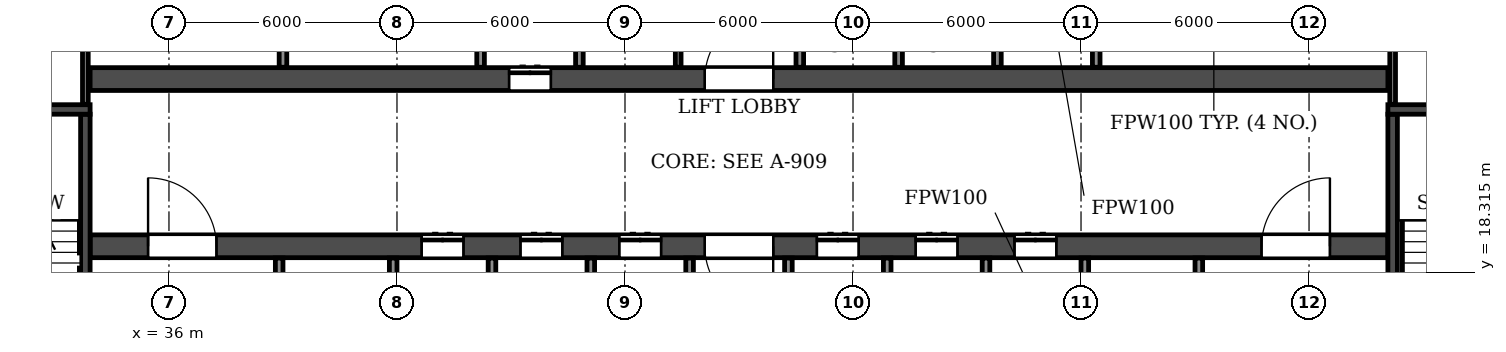
"""IFC4 building model, lengths in metres.
Left out: names, types, materials, properties, quantities, classifications, styles, units other than length and angle.
Written with IfcOpenShell. Run it as: python <this file> out.ifc"""

import sys

from ifc_helpers import new_model, si_unit, direction, frame, frame_2d, origin, place, context, subcontext, project, spatial, rectangle, extrude, element, fill, save


model = new_model("IFC4")
c1 = context("Model", 3, precision=1e-05, world=origin(), true_north=direction((0.0, 1.0)))
c2 = subcontext(c1, "Body", "Model", "MODEL_VIEW")
j1 = project(units=[si_unit("LENGTHUNIT", "METRE"), si_unit("PLANEANGLEUNIT", "RADIAN")], contexts=[c1])
p1 = place(None, origin())
s1 = spatial("IfcSite", under=j1, at=p1, CompositionType="ELEMENT")
p2 = place(p1, origin())
s2 = spatial("IfcBuilding", under=s1, at=p2, CompositionType="ELEMENT")
p3 = place(p2, frame((0.0, 0.0, 43.2)))
s3 = spatial("IfcBuildingStorey", under=s2, at=p3, CompositionType="ELEMENT", Elevation=43.2)
p4 = place(p3, frame((33.925, 19.0, 0.0), z_axis=(0.0, 0.0, 1.0), x_axis=(1.0, 0.0, 0.0)))
e1 = element("IfcWall", 1, at=p4, inside=s3, PredefinedType="SOLIDWALL", context=c2, shape_type="SweptSolid", body=[
    extrude(rectangle(XDim=34.15, YDim=0.6, at=frame_2d((17.075, 0.0))), origin(), (0.0, 0.0, 1.0), 3.05),
])
p5 = place(p4, frame((16.175, 0.0, 0.0)))
e2 = element("IfcOpeningElement", 2, at=p5, cuts=e1, PredefinedType="OPENING", context=c2, shape_type="SweptSolid", body=[
    extrude(rectangle(XDim=1.8, YDim=2.1, at=frame_2d((0.9, 1.05))), frame((0.0, 0.31, 0.0), z_axis=(0.0, -1.0, 0.0), x_axis=(1.0, 0.0, 0.0)), (0.0, 0.0, 1.0), 0.62),
])
p6 = place(p4, frame((1.525, 0.0, 0.0)))
e3 = element("IfcOpeningElement", 3, at=p6, cuts=e1, PredefinedType="OPENING", context=c2, shape_type="SweptSolid", body=[
    extrude(rectangle(XDim=1.8, YDim=2.1, at=frame_2d((0.9, 1.05))), frame((0.0, 0.31, 0.0), z_axis=(0.0, -1.0, 0.0), x_axis=(1.0, 0.0, 0.0)), (0.0, 0.0, 1.0), 0.62),
])
p7 = place(p4, frame((8.725, 0.0, 0.0)))
e4 = element("IfcOpeningElement", 4, at=p7, cuts=e1, PredefinedType="OPENING", context=c2, shape_type="SweptSolid", body=[
    extrude(rectangle(XDim=1.1, YDim=2.1, at=frame_2d((0.55, 1.05))), frame((0.0, 0.31, 0.0), z_axis=(0.0, -1.0, 0.0), x_axis=(1.0, 0.0, 0.0)), (0.0, 0.0, 1.0), 0.62),
])
p8 = place(p4, frame((11.325, 0.0, 0.0)))
e5 = element("IfcOpeningElement", 5, at=p8, cuts=e1, PredefinedType="OPENING", context=c2, shape_type="SweptSolid", body=[
    extrude(rectangle(XDim=1.1, YDim=2.1, at=frame_2d((0.55, 1.05))), frame((0.0, 0.31, 0.0), z_axis=(0.0, -1.0, 0.0), x_axis=(1.0, 0.0, 0.0)), (0.0, 0.0, 1.0), 0.62),
])
p9 = place(p4, frame((13.925, 0.0, 0.0)))
e6 = element("IfcOpeningElement", 6, at=p9, cuts=e1, PredefinedType="OPENING", context=c2, shape_type="SweptSolid", body=[
    extrude(rectangle(XDim=1.1, YDim=2.1, at=frame_2d((0.55, 1.05))), frame((0.0, 0.31, 0.0), z_axis=(0.0, -1.0, 0.0), x_axis=(1.0, 0.0, 0.0)), (0.0, 0.0, 1.0), 0.62),
])
p10 = place(p4, frame((19.125, 0.0, 0.0)))
e7 = element("IfcOpeningElement", 7, at=p10, cuts=e1, PredefinedType="OPENING", context=c2, shape_type="SweptSolid", body=[
    extrude(rectangle(XDim=1.1, YDim=2.1, at=frame_2d((0.55, 1.05))), frame((0.0, 0.31, 0.0), z_axis=(0.0, -1.0, 0.0), x_axis=(1.0, 0.0, 0.0)), (0.0, 0.0, 1.0), 0.62),
])
p11 = place(p4, frame((21.725, 0.0, 0.0)))
e8 = element("IfcOpeningElement", 8, at=p11, cuts=e1, PredefinedType="OPENING", context=c2, shape_type="SweptSolid", body=[
    extrude(rectangle(XDim=1.1, YDim=2.1, at=frame_2d((0.55, 1.05))), frame((0.0, 0.31, 0.0), z_axis=(0.0, -1.0, 0.0), x_axis=(1.0, 0.0, 0.0)), (0.0, 0.0, 1.0), 0.62),
])
p12 = place(p4, frame((24.325, 0.0, 0.0)))
e9 = element("IfcOpeningElement", 9, at=p12, cuts=e1, PredefinedType="OPENING", context=c2, shape_type="SweptSolid", body=[
    extrude(rectangle(XDim=1.1, YDim=2.1, at=frame_2d((0.55, 1.05))), frame((0.0, 0.31, 0.0), z_axis=(0.0, -1.0, 0.0), x_axis=(1.0, 0.0, 0.0)), (0.0, 0.0, 1.0), 0.62),
])
p13 = place(p4, frame((30.825, 0.0, 0.0)))
e10 = element("IfcOpeningElement", 10, at=p13, cuts=e1, PredefinedType="OPENING", context=c2, shape_type="SweptSolid", body=[
    extrude(rectangle(XDim=1.8, YDim=2.1, at=frame_2d((0.9, 1.05))), frame((0.0, 0.31, 0.0), z_axis=(0.0, -1.0, 0.0), x_axis=(1.0, 0.0, 0.0)), (0.0, 0.0, 1.0), 0.62),
])
p14 = place(p3, frame((33.925, 23.4, 0.0), z_axis=(0.0, 0.0, 1.0), x_axis=(1.0, 0.0, 0.0)))
e11 = element("IfcWall", 11, at=p14, inside=s3, PredefinedType="SOLIDWALL", context=c2, shape_type="SweptSolid", body=[
    extrude(rectangle(XDim=34.15, YDim=0.6, at=frame_2d((17.075, 0.0))), origin(), (0.0, 0.0, 1.0), 3.05),
])
p15 = place(p14, frame((16.175, 0.0, 0.0)))
e12 = element("IfcOpeningElement", 12, at=p15, cuts=e11, PredefinedType="OPENING", context=c2, shape_type="SweptSolid", body=[
    extrude(rectangle(XDim=1.8, YDim=2.1, at=frame_2d((0.9, 1.05))), frame((0.0, 0.31, 0.0), z_axis=(0.0, -1.0, 0.0), x_axis=(1.0, 0.0, 0.0)), (0.0, 0.0, 1.0), 0.62),
])
p16 = place(p14, frame((11.025, 0.0, 0.0)))
e13 = element("IfcOpeningElement", 13, at=p16, cuts=e11, PredefinedType="OPENING", context=c2, shape_type="SweptSolid", body=[
    extrude(rectangle(XDim=1.1, YDim=2.1, at=frame_2d((0.55, 1.05))), frame((0.0, 0.31, 0.0), z_axis=(0.0, -1.0, 0.0), x_axis=(1.0, 0.0, 0.0)), (0.0, 0.0, 1.0), 0.62),
])
p17 = place(p3, frame((33.8, 14.9, 0.0), z_axis=(0.0, 0.0, 1.0), x_axis=(0.0, 1.0, 0.0)))
e14 = element("IfcWall", 14, at=p17, inside=s3, PredefinedType="SOLIDWALL", context=c2, shape_type="SweptSolid", body=[
    extrude(rectangle(XDim=7.575, YDim=0.25, at=frame_2d((3.788, 0.0))), origin(), (0.0, 0.0, 1.0), 3.05),
])
p18 = place(p17, frame((0.4, 0.0, 0.0)))
e15 = element("IfcOpeningElement", 15, at=p18, cuts=e14, PredefinedType="OPENING", context=c2, shape_type="SweptSolid", body=[
    extrude(rectangle(XDim=1.0, YDim=2.1, at=frame_2d((0.5, 1.05))), frame((0.0, 0.135, 0.0), z_axis=(0.0, -1.0, 0.0), x_axis=(1.0, 0.0, 0.0)), (0.0, 0.0, 1.0), 0.27),
])
p19 = place(p3, frame((29.875, 22.6, 0.0), z_axis=(0.0, 0.0, 1.0), x_axis=(1.0, 0.0, 0.0)))
e16 = element("IfcWall", 16, at=p19, inside=s3, PredefinedType="SOLIDWALL", context=c2, shape_type="SweptSolid", body=[
    extrude(rectangle(XDim=4.05, YDim=0.25, at=frame_2d((2.025, 0.0))), origin(), (0.0, 0.0, 1.0), 3.05),
])
p20 = place(p3, frame((68.2, 14.9, 0.0), z_axis=(0.0, 0.0, 1.0), x_axis=(0.0, 1.0, 0.0)))
e17 = element("IfcWall", 17, at=p20, inside=s3, PredefinedType="SOLIDWALL", context=c2, shape_type="SweptSolid", body=[
    extrude(rectangle(XDim=7.575, YDim=0.25, at=frame_2d((3.788, 0.0))), origin(), (0.0, 0.0, 1.0), 3.05),
])
p21 = place(p20, frame((0.4, 0.0, 0.0)))
e18 = element("IfcOpeningElement", 18, at=p21, cuts=e17, PredefinedType="OPENING", context=c2, shape_type="SweptSolid", body=[
    extrude(rectangle(XDim=1.0, YDim=2.1, at=frame_2d((0.5, 1.05))), frame((0.0, 0.135, 0.0), z_axis=(0.0, -1.0, 0.0), x_axis=(1.0, 0.0, 0.0)), (0.0, 0.0, 1.0), 0.27),
])
p22 = place(p3, frame((68.075, 22.6, 0.0), z_axis=(0.0, 0.0, 1.0), x_axis=(1.0, 0.0, 0.0)))
e19 = element("IfcWall", 19, at=p22, inside=s3, PredefinedType="SOLIDWALL", context=c2, shape_type="SweptSolid", body=[
    extrude(rectangle(XDim=4.05, YDim=0.25, at=frame_2d((2.025, 0.0))), origin(), (0.0, 0.0, 1.0), 3.05),
])
p23 = place(p3, frame((49.4, 23.71, 0.0), z_axis=(0.0, 0.0, 1.0), x_axis=(0.0, 1.0, 0.0)))
e20 = element("IfcWall", 20, at=p23, inside=s3, PredefinedType="PARTITIONING", context=c2, shape_type="SweptSolid", body=[
    extrude(rectangle(XDim=3.78, YDim=0.15, at=frame_2d((1.89, 0.0))), origin(), (0.0, 0.0, 1.0), 3.05),
])
p24 = place(p3, frame((39.0, 23.71, 0.0), z_axis=(0.0, 0.0, 1.0), x_axis=(0.0, 1.0, 0.0)))
e21 = element("IfcWall", 21, at=p24, inside=s3, PredefinedType="PARTITIONING", context=c2, shape_type="SweptSolid", body=[
    extrude(rectangle(XDim=3.78, YDim=0.2, at=frame_2d((1.89, 0.0))), origin(), (0.0, 0.0, 1.0), 3.05),
])
for number, where, z_axis, x_axis in (
    (22, (33.8, 22.735, 0.0), (0.0, 0.0, 1.0), (0.0, 1.0, 0.0)),
    (23, (68.2, 22.735, 0.0), (0.0, 0.0, 1.0), (0.0, 1.0, 0.0)),
):
    element("IfcWall", number, at=place(p3, frame(where, z_axis=z_axis, x_axis=x_axis)), inside=s3, PredefinedType="PARTITIONING", context=c2, shape_type="SweptSolid", body=[
        extrude(rectangle(XDim=4.755, YDim=0.15, at=frame_2d((2.377, 0.0))), origin(), (0.0, 0.0, 1.0), 3.05),
    ])
p25 = place(p3, frame((38.9, 14.91, 0.0), z_axis=(0.0, 0.0, 1.0), x_axis=(0.0, 1.0, 0.0)))
e24 = element("IfcWall", 24, at=p25, inside=s3, PredefinedType="PARTITIONING", context=c2, shape_type="SweptSolid", body=[
    extrude(rectangle(XDim=3.78, YDim=0.2, at=frame_2d((1.89, 0.0))), origin(), (0.0, 0.0, 1.0), 3.05),
])
p26 = place(p25, frame((1.34, 0.0, 0.0)))
e25 = element("IfcOpeningElement", 25, at=p26, cuts=e24, PredefinedType="OPENING", context=c2, shape_type="SweptSolid", body=[
    extrude(rectangle(XDim=1.1, YDim=2.1, at=frame_2d((0.55, 1.05))), frame((0.0, 0.11, 0.0), z_axis=(0.0, -1.0, 0.0), x_axis=(1.0, 0.0, 0.0)), (0.0, 0.0, 1.0), 0.22),
])
for number, where, z_axis, x_axis in (
    (26, (41.9, 14.91, 0.0), (0.0, 0.0, 1.0), (0.0, 1.0, 0.0)),
    (27, (44.2, 23.71, 0.0), (0.0, 0.0, 1.0), (0.0, 1.0, 0.0)),
):
    element("IfcWall", number, at=place(p3, frame(where, z_axis=z_axis, x_axis=x_axis)), inside=s3, PredefinedType="PARTITIONING", context=c2, shape_type="SweptSolid", body=[
        extrude(rectangle(XDim=3.78, YDim=0.2, at=frame_2d((1.89, 0.0))), origin(), (0.0, 0.0, 1.0), 3.05),
    ])
p27 = place(p3, frame((44.5, 16.3, 0.0), z_axis=(0.0, 0.0, 1.0), x_axis=(0.0, 1.0, 0.0)))
e28 = element("IfcWall", 28, at=p27, inside=s3, PredefinedType="PARTITIONING", context=c2, shape_type="SweptSolid", body=[
    extrude(rectangle(XDim=2.39, YDim=0.2, at=frame_2d((1.195, 0.0))), origin(), (0.0, 0.0, 1.0), 3.05),
])
p28 = place(p3, frame((46.8, 23.71, 0.0), z_axis=(0.0, 0.0, 1.0), x_axis=(0.0, 1.0, 0.0)))
e29 = element("IfcWall", 29, at=p28, inside=s3, PredefinedType="PARTITIONING", context=c2, shape_type="SweptSolid", body=[
    extrude(rectangle(XDim=3.78, YDim=0.2, at=frame_2d((1.89, 0.0))), origin(), (0.0, 0.0, 1.0), 3.05),
])
for number, where, z_axis, x_axis in (
    (30, (47.1, 16.3, 0.0), (0.0, 0.0, 1.0), (0.0, 1.0, 0.0)),
    (31, (49.7, 16.3, 0.0), (0.0, 0.0, 1.0), (0.0, 1.0, 0.0)),
    (32, (52.3, 16.3, 0.0), (0.0, 0.0, 1.0), (0.0, 1.0, 0.0)),
):
    element("IfcWall", number, at=place(p3, frame(where, z_axis=z_axis, x_axis=x_axis)), inside=s3, PredefinedType="PARTITIONING", context=c2, shape_type="SweptSolid", body=[
        extrude(rectangle(XDim=2.39, YDim=0.2, at=frame_2d((1.195, 0.0))), origin(), (0.0, 0.0, 1.0), 3.05),
    ])
p29 = place(p3, frame((52.6, 23.71, 0.0), z_axis=(0.0, 0.0, 1.0), x_axis=(0.0, 1.0, 0.0)))
e33 = element("IfcWall", 33, at=p29, inside=s3, PredefinedType="PARTITIONING", context=c2, shape_type="SweptSolid", body=[
    extrude(rectangle(XDim=2.39, YDim=0.2, at=frame_2d((1.195, 0.0))), origin(), (0.0, 0.0, 1.0), 3.05),
])
p30 = place(p3, frame((54.9, 16.3, 0.0), z_axis=(0.0, 0.0, 1.0), x_axis=(0.0, 1.0, 0.0)))
e34 = element("IfcWall", 34, at=p30, inside=s3, PredefinedType="PARTITIONING", context=c2, shape_type="SweptSolid", body=[
    extrude(rectangle(XDim=2.39, YDim=0.2, at=frame_2d((1.195, 0.0))), origin(), (0.0, 0.0, 1.0), 3.05),
])
p31 = place(p3, frame((55.2, 23.71, 0.0), z_axis=(0.0, 0.0, 1.0), x_axis=(0.0, 1.0, 0.0)))
e35 = element("IfcWall", 35, at=p31, inside=s3, PredefinedType="PARTITIONING", context=c2, shape_type="SweptSolid", body=[
    extrude(rectangle(XDim=2.39, YDim=0.2, at=frame_2d((1.195, 0.0))), origin(), (0.0, 0.0, 1.0), 3.05),
])
p32 = place(p3, frame((57.5, 16.3, 0.0), z_axis=(0.0, 0.0, 1.0), x_axis=(0.0, 1.0, 0.0)))
e36 = element("IfcWall", 36, at=p32, inside=s3, PredefinedType="PARTITIONING", context=c2, shape_type="SweptSolid", body=[
    extrude(rectangle(XDim=2.39, YDim=0.2, at=frame_2d((1.195, 0.0))), origin(), (0.0, 0.0, 1.0), 3.05),
])
p33 = place(p3, frame((57.8, 23.71, 0.0), z_axis=(0.0, 0.0, 1.0), x_axis=(0.0, 1.0, 0.0)))
e37 = element("IfcWall", 37, at=p33, inside=s3, PredefinedType="PARTITIONING", context=c2, shape_type="SweptSolid", body=[
    extrude(rectangle(XDim=2.39, YDim=0.2, at=frame_2d((1.195, 0.0))), origin(), (0.0, 0.0, 1.0), 3.05),
])
p34 = place(p3, frame((60.1, 14.91, 0.0), z_axis=(0.0, 0.0, 1.0), x_axis=(0.0, 1.0, 0.0)))
e38 = element("IfcWall", 38, at=p34, inside=s3, PredefinedType="PARTITIONING", context=c2, shape_type="SweptSolid", body=[
    extrude(rectangle(XDim=3.78, YDim=0.2, at=frame_2d((1.89, 0.0))), origin(), (0.0, 0.0, 1.0), 3.05),
])
p35 = place(p3, frame((60.4, 23.71, 0.0), z_axis=(0.0, 0.0, 1.0), x_axis=(0.0, 1.0, 0.0)))
e39 = element("IfcWall", 39, at=p35, inside=s3, PredefinedType="PARTITIONING", context=c2, shape_type="SweptSolid", body=[
    extrude(rectangle(XDim=2.39, YDim=0.2, at=frame_2d((1.195, 0.0))), origin(), (0.0, 0.0, 1.0), 3.05),
])
p36 = place(p3, frame((63.1, 14.91, 0.0), z_axis=(0.0, 0.0, 1.0), x_axis=(0.0, 1.0, 0.0)))
e40 = element("IfcWall", 40, at=p36, inside=s3, PredefinedType="PARTITIONING", context=c2, shape_type="SweptSolid", body=[
    extrude(rectangle(XDim=3.78, YDim=0.2, at=frame_2d((1.89, 0.0))), origin(), (0.0, 0.0, 1.0), 3.05),
])
p37 = place(p36, frame((1.34, 0.0, 0.0)))
e41 = element("IfcOpeningElement", 41, at=p37, cuts=e40, PredefinedType="OPENING", context=c2, shape_type="SweptSolid", body=[
    extrude(rectangle(XDim=1.1, YDim=2.1, at=frame_2d((0.55, 1.05))), frame((0.0, 0.11, 0.0), z_axis=(0.0, -1.0, 0.0), x_axis=(1.0, 0.0, 0.0)), (0.0, 0.0, 1.0), 0.22),
])
p38 = place(p15, origin())
e42 = element("IfcDoor", 42, at=p38, inside=s3, OperationType="DOUBLE_DOOR_SINGLE_SWING", PredefinedType="DOOR", context=c2, shape_type="SweptSolid", body=[
    extrude(rectangle(XDim=1.8, YDim=2.1, at=frame_2d((0.9, 1.05))), frame((0.0, 0.025, 0.0), z_axis=(0.0, -1.0, 0.0), x_axis=(1.0, 0.0, 0.0)), (0.0, 0.0, 1.0), 0.05),
])
fill(e12, e42)
p39 = place(p5, frame((1.8, 0.0, 0.0), z_axis=(0.0, 0.0, 1.0), x_axis=(-1.0, 0.0, 0.0)))
e43 = element("IfcDoor", 43, at=p39, inside=s3, OperationType="DOUBLE_DOOR_SINGLE_SWING", PredefinedType="DOOR", context=c2, shape_type="SweptSolid", body=[
    extrude(rectangle(XDim=1.8, YDim=2.1, at=frame_2d((0.9, 1.05))), frame((0.0, 0.025, 0.0), z_axis=(0.0, -1.0, 0.0), x_axis=(1.0, 0.0, 0.0)), (0.0, 0.0, 1.0), 0.05),
])
fill(e2, e43)
p40 = place(p6, origin())
e44 = element("IfcDoor", 44, at=p40, inside=s3, OperationType="DOUBLE_DOOR_SINGLE_SWING", PredefinedType="DOOR", context=c2, shape_type="SweptSolid", body=[
    extrude(rectangle(XDim=1.8, YDim=2.1, at=frame_2d((0.9, 1.05))), frame((0.0, 0.025, 0.0), z_axis=(0.0, -1.0, 0.0), x_axis=(1.0, 0.0, 0.0)), (0.0, 0.0, 1.0), 0.05),
])
fill(e3, e44)
p41 = place(p7, origin())
e45 = element("IfcDoor", 45, at=p41, inside=s3, OperationType="DOUBLE_DOOR_SLIDING", PredefinedType="DOOR", context=c2, shape_type="SweptSolid", body=[
    extrude(rectangle(XDim=1.1, YDim=2.1, at=frame_2d((0.55, 1.05))), frame((0.0, 0.025, 0.0), z_axis=(0.0, -1.0, 0.0), x_axis=(1.0, 0.0, 0.0)), (0.0, 0.0, 1.0), 0.05),
])
fill(e4, e45)
p42 = place(p16, origin())
e46 = element("IfcDoor", 46, at=p42, inside=s3, OperationType="DOUBLE_DOOR_SLIDING", PredefinedType="DOOR", context=c2, shape_type="SweptSolid", body=[
    extrude(rectangle(XDim=1.1, YDim=2.1, at=frame_2d((0.55, 1.05))), frame((0.0, 0.025, 0.0), z_axis=(0.0, -1.0, 0.0), x_axis=(1.0, 0.0, 0.0)), (0.0, 0.0, 1.0), 0.05),
])
fill(e13, e46)
p43 = place(p8, origin())
e47 = element("IfcDoor", 47, at=p43, inside=s3, OperationType="DOUBLE_DOOR_SLIDING", PredefinedType="DOOR", context=c2, shape_type="SweptSolid", body=[
    extrude(rectangle(XDim=1.1, YDim=2.1, at=frame_2d((0.55, 1.05))), frame((0.0, 0.025, 0.0), z_axis=(0.0, -1.0, 0.0), x_axis=(1.0, 0.0, 0.0)), (0.0, 0.0, 1.0), 0.05),
])
fill(e5, e47)
p44 = place(p9, origin())
e48 = element("IfcDoor", 48, at=p44, inside=s3, OperationType="DOUBLE_DOOR_SLIDING", PredefinedType="DOOR", context=c2, shape_type="SweptSolid", body=[
    extrude(rectangle(XDim=1.1, YDim=2.1, at=frame_2d((0.55, 1.05))), frame((0.0, 0.025, 0.0), z_axis=(0.0, -1.0, 0.0), x_axis=(1.0, 0.0, 0.0)), (0.0, 0.0, 1.0), 0.05),
])
fill(e6, e48)
p45 = place(p10, origin())
e49 = element("IfcDoor", 49, at=p45, inside=s3, OperationType="DOUBLE_DOOR_SLIDING", PredefinedType="DOOR", context=c2, shape_type="SweptSolid", body=[
    extrude(rectangle(XDim=1.1, YDim=2.1, at=frame_2d((0.55, 1.05))), frame((0.0, 0.025, 0.0), z_axis=(0.0, -1.0, 0.0), x_axis=(1.0, 0.0, 0.0)), (0.0, 0.0, 1.0), 0.05),
])
fill(e7, e49)
p46 = place(p11, origin())
e50 = element("IfcDoor", 50, at=p46, inside=s3, OperationType="DOUBLE_DOOR_SLIDING", PredefinedType="DOOR", context=c2, shape_type="SweptSolid", body=[
    extrude(rectangle(XDim=1.1, YDim=2.1, at=frame_2d((0.55, 1.05))), frame((0.0, 0.025, 0.0), z_axis=(0.0, -1.0, 0.0), x_axis=(1.0, 0.0, 0.0)), (0.0, 0.0, 1.0), 0.05),
])
fill(e8, e50)
p47 = place(p12, origin())
e51 = element("IfcDoor", 51, at=p47, inside=s3, OperationType="DOUBLE_DOOR_SLIDING", PredefinedType="DOOR", context=c2, shape_type="SweptSolid", body=[
    extrude(rectangle(XDim=1.1, YDim=2.1, at=frame_2d((0.55, 1.05))), frame((0.0, 0.025, 0.0), z_axis=(0.0, -1.0, 0.0), x_axis=(1.0, 0.0, 0.0)), (0.0, 0.0, 1.0), 0.05),
])
fill(e9, e51)
p48 = place(p13, origin())
e52 = element("IfcDoor", 52, at=p48, inside=s3, OperationType="DOUBLE_DOOR_SINGLE_SWING", PredefinedType="DOOR", context=c2, shape_type="SweptSolid", body=[
    extrude(rectangle(XDim=1.8, YDim=2.1, at=frame_2d((0.9, 1.05))), frame((0.0, 0.025, 0.0), z_axis=(0.0, -1.0, 0.0), x_axis=(1.0, 0.0, 0.0)), (0.0, 0.0, 1.0), 0.05),
])
fill(e10, e52)
save(model, sys.argv[1])
